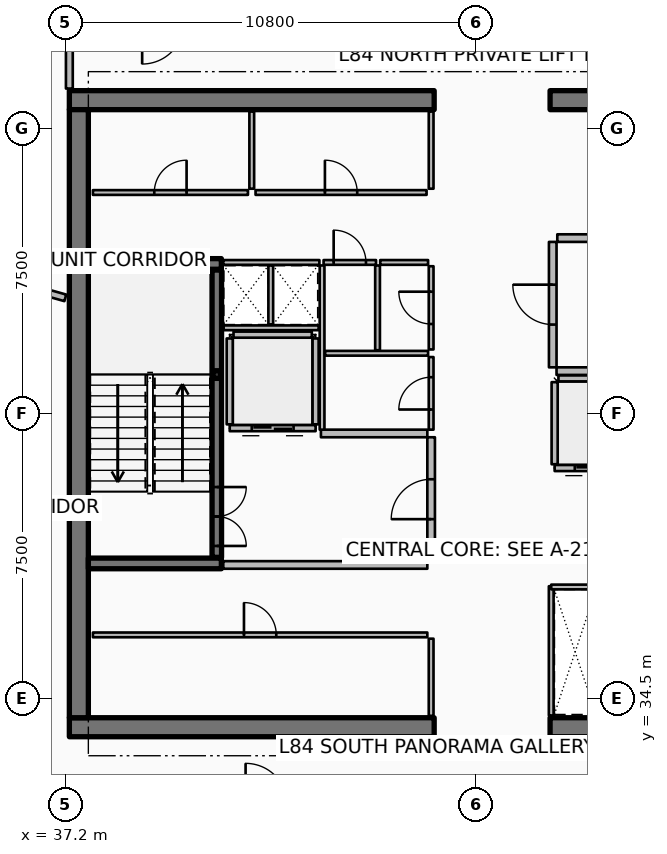
"""IFC4 building model, lengths in metres.
Left out: names, types, materials, properties, quantities, classifications, styles, units other than length and angle.
Written with IfcOpenShell. Run it as: python <this file> out.ifc"""

import sys

from ifc_helpers import new_model, si_unit, direction, frame, frame_2d, origin, origin_2d, place, context, subcontext, project, spatial, rectangle, hollow_rectangle, extrude, element, fill, save


model = new_model("IFC4")
c1 = context("Model", 3, precision=1e-05, world=origin(), true_north=direction((0.0, 1.0)))
c2 = subcontext(c1, "Body", "Model", "MODEL_VIEW")
j1 = project(units=[si_unit("LENGTHUNIT", "METRE"), si_unit("PLANEANGLEUNIT", "RADIAN")], contexts=[c1])
p1 = place(None, origin())
s1 = spatial("IfcSite", under=j1, at=p1, CompositionType="ELEMENT")
p2 = place(p1, origin())
s2 = spatial("IfcBuilding", under=s1, at=p2, CompositionType="ELEMENT")
p3 = place(p2, frame((0.0, 0.0, 334.7)))
s3 = spatial("IfcBuildingStorey", under=s2, at=p3, CompositionType="ELEMENT", Elevation=334.7)
p4 = place(p3, frame((37.3, 33.75, 0.0), z_axis=(0.0, 0.0, 1.0), x_axis=(1.0, 0.0, 0.0)))
e1 = element("IfcWall", 1, at=p4, inside=s3, PredefinedType="SHEAR", context=c2, shape_type="SweptSolid", body=[
    extrude(rectangle(XDim=9.6, YDim=0.5, at=frame_2d((4.8, 0.0))), origin(), (0.0, 0.0, 1.0), 4.2),
])
p5 = place(p3, frame((49.95, 33.75, 0.0), z_axis=(0.0, 0.0, 1.0), x_axis=(1.0, 0.0, 0.0)))
e2 = element("IfcWall", 2, at=p5, inside=s3, PredefinedType="SHEAR", context=c2, shape_type="SweptSolid", body=[
    extrude(rectangle(XDim=9.6, YDim=0.5, at=frame_2d((4.8, 0.0))), origin(), (0.0, 0.0, 1.0), 4.2),
])
p6 = place(p3, frame((37.3, 50.25, 0.0), z_axis=(0.0, 0.0, 1.0), x_axis=(1.0, 0.0, 0.0)))
e3 = element("IfcWall", 3, at=p6, inside=s3, PredefinedType="SHEAR", context=c2, shape_type="SweptSolid", body=[
    extrude(rectangle(XDim=9.6, YDim=0.5, at=frame_2d((4.8, 0.0))), origin(), (0.0, 0.0, 1.0), 4.2),
])
p7 = place(p3, frame((49.95, 50.25, 0.0), z_axis=(0.0, 0.0, 1.0), x_axis=(1.0, 0.0, 0.0)))
e4 = element("IfcWall", 4, at=p7, inside=s3, PredefinedType="SHEAR", context=c2, shape_type="SweptSolid", body=[
    extrude(rectangle(XDim=9.6, YDim=0.5, at=frame_2d((4.8, 0.0))), origin(), (0.0, 0.0, 1.0), 4.2),
])
p8 = place(p3, frame((37.55, 34.0, 0.0), z_axis=(0.0, 0.0, 1.0), x_axis=(0.0, 1.0, 0.0)))
e5 = element("IfcWall", 5, at=p8, inside=s3, PredefinedType="SHEAR", context=c2, shape_type="SweptSolid", body=[
    extrude(rectangle(XDim=16.0, YDim=0.5, at=frame_2d((8.0, 0.0))), origin(), (0.0, 0.0, 1.0), 4.2),
])
for number, where, z_axis, x_axis in (
    (6, (37.8, 38.06, 0.0), (0.0, 0.0, 1.0), (1.0, 0.0, 0.0)),
    (7, (37.8, 45.94, 0.0), (0.0, 0.0, 1.0), (1.0, 0.0, 0.0)),
):
    element("IfcWall", number, at=place(p3, frame(where, z_axis=z_axis, x_axis=x_axis)), inside=s3, PredefinedType="SHEAR", context=c2, shape_type="SweptSolid", body=[
        extrude(rectangle(XDim=3.5, YDim=0.28, at=frame_2d((1.75, 0.0))), origin(), (0.0, 0.0, 1.0), 4.2),
    ])
p9 = place(p3, frame((41.18, 43.03, 0.0), z_axis=(0.0, 0.0, 1.0), x_axis=(1.0, 0.0, 0.0)))
e8 = element("IfcColumn", 8, at=p9, inside=s3, PredefinedType="COLUMN", context=c2, shape_type="SweptSolid", body=[
    extrude(hollow_rectangle(XDim=0.2, YDim=0.2, WallThickness=0.01, InnerFilletRadius=0.01, OuterFilletRadius=0.02, at=origin_2d()), origin(), (0.0, 0.0, 1.0), 1.895),
])
p10 = place(p3, frame((41.18, 38.22, 0.0), z_axis=(0.0, 0.0, 1.0), x_axis=(0.0, 1.0, 0.0)))
e9 = element("IfcWall", 9, at=p10, inside=s3, PredefinedType="SOLIDWALL", context=c2, shape_type="SweptSolid", body=[
    extrude(rectangle(XDim=7.56, YDim=0.25, at=frame_2d((3.78, 0.0))), origin(), (0.0, 0.0, 1.0), 3.94),
])
p11 = place(p10, frame((0.3, 0.0, 0.0)))
e10 = element("IfcOpeningElement", 10, at=p11, cuts=e9, PredefinedType="OPENING", context=c2, shape_type="SweptSolid", body=[
    extrude(rectangle(XDim=1.55, YDim=2.15, at=frame_2d((0.775, 1.075))), frame((0.0, 0.135, 0.0), z_axis=(0.0, -1.0, 0.0), x_axis=(1.0, 0.0, 0.0)), (0.0, 0.0, 1.0), 0.27),
])
p12 = place(p3, frame((43.78, 41.62, 0.0), z_axis=(0.0, 0.0, 1.0), x_axis=(-1.0, 0.0, 0.0)))
e11 = element("IfcWall", 11, at=p12, inside=s3, PredefinedType="PARTITIONING", context=c2, shape_type="SweptSolid", body=[
    extrude(rectangle(XDim=2.26, YDim=0.16, at=frame_2d((1.13, 0.0))), origin(), (0.0, 0.0, 1.0), 3.94),
])
p13 = place(p12, frame((0.58, 0.0, 0.0)))
e12 = element("IfcOpeningElement", 12, at=p13, cuts=e11, PredefinedType="OPENING", context=c2, shape_type="SweptSolid", body=[
    extrude(rectangle(XDim=1.1, YDim=2.1, at=frame_2d((0.55, 1.05))), frame((0.0, 0.09, 0.0), z_axis=(0.0, -1.0, 0.0), x_axis=(1.0, 0.0, 0.0)), (0.0, 0.0, 1.0), 0.18),
])
for number, where, z_axis, x_axis in (
    (13, (43.78, 41.72, 0.0), (0.0, 0.0, 1.0), (0.0, 1.0, 0.0)),
    (14, (41.52, 41.72, 0.0), (0.0, 0.0, 1.0), (0.0, 1.0, 0.0)),
):
    element("IfcWall", number, at=place(p3, frame(where, z_axis=z_axis, x_axis=x_axis)), inside=s3, PredefinedType="PARTITIONING", context=c2, shape_type="SweptSolid", body=[
        extrude(rectangle(XDim=2.26, YDim=0.16, at=frame_2d((1.13, 0.0))), origin(), (0.0, 0.0, 1.0), 3.94),
    ])
p14 = place(p3, frame((41.62, 44.08, 0.0), z_axis=(0.0, 0.0, 1.0), x_axis=(1.0, 0.0, 0.0)))
e15 = element("IfcWall", 15, at=p14, inside=s3, PredefinedType="PARTITIONING", context=c2, shape_type="SweptSolid", body=[
    extrude(rectangle(XDim=2.06, YDim=0.16, at=frame_2d((1.03, 0.0))), origin(), (0.0, 0.0, 1.0), 3.94),
])
p15 = place(p3, frame((52.23, 40.57, 0.0), z_axis=(0.0, 0.0, 1.0), x_axis=(-1.0, 0.0, 0.0)))
e16 = element("IfcWall", 16, at=p15, inside=s3, PredefinedType="PARTITIONING", context=c2, shape_type="SweptSolid", body=[
    extrude(rectangle(XDim=2.16, YDim=0.16, at=frame_2d((1.08, 0.0))), origin(), (0.0, 0.0, 1.0), 3.94),
])
p16 = place(p15, frame((0.53, 0.0, 0.0)))
e17 = element("IfcOpeningElement", 17, at=p16, cuts=e16, PredefinedType="OPENING", context=c2, shape_type="SweptSolid", body=[
    extrude(rectangle(XDim=1.1, YDim=2.1, at=frame_2d((0.55, 1.05))), frame((0.0, 0.09, 0.0), z_axis=(0.0, -1.0, 0.0), x_axis=(1.0, 0.0, 0.0)), (0.0, 0.0, 1.0), 0.18),
])
p17 = place(p3, frame((50.07, 40.67, 0.0), z_axis=(0.0, 0.0, 1.0), x_axis=(0.0, 1.0, 0.0)))
e18 = element("IfcWall", 18, at=p17, inside=s3, PredefinedType="PARTITIONING", context=c2, shape_type="SweptSolid", body=[
    extrude(rectangle(XDim=2.16, YDim=0.16, at=frame_2d((1.08, 0.0))), origin(), (0.0, 0.0, 1.0), 3.94),
])
p18 = place(p3, frame((50.17, 42.93, 0.0), z_axis=(0.0, 0.0, 1.0), x_axis=(1.0, 0.0, 0.0)))
e19 = element("IfcWall", 19, at=p18, inside=s3, PredefinedType="PARTITIONING", context=c2, shape_type="SweptSolid", body=[
    extrude(rectangle(XDim=1.96, YDim=0.16, at=frame_2d((0.98, 0.0))), origin(), (0.0, 0.0, 1.0), 3.94),
])
p19 = place(p3, frame((46.82, 34.05, 0.0), z_axis=(0.0, 0.0, 1.0), x_axis=(0.0, 1.0, 0.0)))
e20 = element("IfcWall", 20, at=p19, inside=s3, PredefinedType="PARTITIONING", context=c2, shape_type="SweptSolid", body=[
    extrude(rectangle(XDim=2.03, YDim=0.125, at=frame_2d((1.015, 0.0))), origin(), (0.0, 0.0, 1.0), 3.38),
])
p20 = place(p3, frame((37.92, 36.18, 0.0), z_axis=(0.0, 0.0, 1.0), x_axis=(1.0, 0.0, 0.0)))
e21 = element("IfcWall", 21, at=p20, inside=s3, PredefinedType="PARTITIONING", context=c2, shape_type="SweptSolid", body=[
    extrude(rectangle(XDim=8.8, YDim=0.125, at=frame_2d((4.4, 0.0))), origin(), (0.0, 0.0, 1.0), 3.38),
])
p21 = place(p20, frame((3.975, 0.0, 0.0)))
e22 = element("IfcOpeningElement", 22, at=p21, cuts=e21, PredefinedType="OPENING", context=c2, shape_type="SweptSolid", body=[
    extrude(rectangle(XDim=0.85, YDim=2.06, at=frame_2d((0.425, 1.03))), frame((0.0, 0.073, 0.0), z_axis=(0.0, -1.0, 0.0), x_axis=(1.0, 0.0, 0.0)), (0.0, 0.0, 1.0), 0.145),
])
for number, where, z_axis, x_axis in (
    (23, (46.82, 47.92, 0.0), (0.0, 0.0, 1.0), (0.0, 1.0, 0.0)),
    (24, (42.1, 47.92, 0.0), (0.0, 0.0, 1.0), (0.0, 1.0, 0.0)),
):
    element("IfcWall", number, at=place(p3, frame(where, z_axis=z_axis, x_axis=x_axis)), inside=s3, PredefinedType="PARTITIONING", context=c2, shape_type="SweptSolid", body=[
        extrude(rectangle(XDim=2.03, YDim=0.125, at=frame_2d((1.015, 0.0))), origin(), (0.0, 0.0, 1.0), 3.38),
    ])
p22 = place(p3, frame((37.92, 47.82, 0.0), z_axis=(0.0, 0.0, 1.0), x_axis=(1.0, 0.0, 0.0)))
e25 = element("IfcWall", 25, at=p22, inside=s3, PredefinedType="PARTITIONING", context=c2, shape_type="SweptSolid", body=[
    extrude(rectangle(XDim=4.08, YDim=0.125, at=frame_2d((2.04, 0.0))), origin(), (0.0, 0.0, 1.0), 3.38),
])
p23 = place(p22, frame((1.615, 0.0, 0.0)))
e26 = element("IfcOpeningElement", 26, at=p23, cuts=e25, PredefinedType="OPENING", context=c2, shape_type="SweptSolid", body=[
    extrude(rectangle(XDim=0.85, YDim=2.06, at=frame_2d((0.425, 1.03))), frame((0.0, 0.073, 0.0), z_axis=(0.0, -1.0, 0.0), x_axis=(1.0, 0.0, 0.0)), (0.0, 0.0, 1.0), 0.145),
])
p24 = place(p3, frame((42.2, 47.82, 0.0), z_axis=(0.0, 0.0, 1.0), x_axis=(1.0, 0.0, 0.0)))
e27 = element("IfcWall", 27, at=p24, inside=s3, PredefinedType="PARTITIONING", context=c2, shape_type="SweptSolid", body=[
    extrude(rectangle(XDim=4.5, YDim=0.125, at=frame_2d((2.25, 0.0))), origin(), (0.0, 0.0, 1.0), 3.38),
])
p25 = place(p24, frame((1.825, 0.0, 0.0)))
e28 = element("IfcOpeningElement", 28, at=p25, cuts=e27, PredefinedType="OPENING", context=c2, shape_type="SweptSolid", body=[
    extrude(rectangle(XDim=0.85, YDim=2.06, at=frame_2d((0.425, 1.03))), frame((0.0, 0.073, 0.0), z_axis=(0.0, -1.0, 0.0), x_axis=(1.0, 0.0, 0.0)), (0.0, 0.0, 1.0), 0.145),
])
p26 = place(p3, frame((41.35, 38.02, 0.0), z_axis=(0.0, 0.0, 1.0), x_axis=(1.0, 0.0, 0.0)))
e29 = element("IfcWall", 29, at=p26, inside=s3, PredefinedType="PARTITIONING", context=c2, shape_type="SweptSolid", body=[
    extrude(rectangle(XDim=5.37, YDim=0.2, at=frame_2d((2.685, 0.0))), origin(), (0.0, 0.0, 1.0), 3.94),
])
p27 = place(p3, frame((43.92, 41.48, 0.0), z_axis=(0.0, 0.0, 1.0), x_axis=(1.0, 0.0, 0.0)))
e30 = element("IfcWall", 30, at=p27, inside=s3, PredefinedType="PARTITIONING", context=c2, shape_type="SweptSolid", body=[
    extrude(rectangle(XDim=2.8, YDim=0.2, at=frame_2d((1.4, 0.0))), origin(), (0.0, 0.0, 1.0), 3.94),
])
p28 = place(p3, frame((46.82, 38.12, 0.0), z_axis=(0.0, 0.0, 1.0), x_axis=(0.0, 1.0, 0.0)))
e31 = element("IfcWall", 31, at=p28, inside=s3, PredefinedType="PARTITIONING", context=c2, shape_type="SweptSolid", body=[
    extrude(rectangle(XDim=3.26, YDim=0.2, at=frame_2d((1.63, 0.0))), origin(), (0.0, 0.0, 1.0), 3.94),
])
p29 = place(p28, frame((1.105, 0.0, 0.0)))
e32 = element("IfcOpeningElement", 32, at=p29, cuts=e31, PredefinedType="OPENING", context=c2, shape_type="SweptSolid", body=[
    extrude(rectangle(XDim=1.05, YDim=2.1, at=frame_2d((0.525, 1.05))), frame((0.0, 0.11, 0.0), z_axis=(0.0, -1.0, 0.0), x_axis=(1.0, 0.0, 0.0)), (0.0, 0.0, 1.0), 0.22),
])
p30 = place(p3, frame((50.12, 43.12, 0.0), z_axis=(0.0, 0.0, 1.0), x_axis=(1.0, 0.0, 0.0)))
e33 = element("IfcWall", 33, at=p30, inside=s3, PredefinedType="PARTITIONING", context=c2, shape_type="SweptSolid", body=[
    extrude(rectangle(XDim=8.88, YDim=0.2, at=frame_2d((4.44, 0.0))), origin(), (0.0, 0.0, 1.0), 3.94),
])
p31 = place(p3, frame((50.14, 46.62, 0.0), z_axis=(0.0, 0.0, 1.0), x_axis=(1.0, 0.0, 0.0)))
e34 = element("IfcWall", 34, at=p31, inside=s3, PredefinedType="PARTITIONING", context=c2, shape_type="SweptSolid", body=[
    extrude(rectangle(XDim=1.02, YDim=0.2, at=frame_2d((0.51, 0.0))), origin(), (0.0, 0.0, 1.0), 3.94),
])
p32 = place(p3, frame((50.02, 43.22, 0.0), z_axis=(0.0, 0.0, 1.0), x_axis=(0.0, 1.0, 0.0)))
e35 = element("IfcWall", 35, at=p32, inside=s3, PredefinedType="PARTITIONING", context=c2, shape_type="SweptSolid", body=[
    extrude(rectangle(XDim=3.3, YDim=0.2, at=frame_2d((1.65, 0.0))), origin(), (0.0, 0.0, 1.0), 3.94),
])
p33 = place(p32, frame((1.125, 0.0, 0.0)))
e36 = element("IfcOpeningElement", 36, at=p33, cuts=e35, PredefinedType="OPENING", context=c2, shape_type="SweptSolid", body=[
    extrude(rectangle(XDim=1.05, YDim=2.1, at=frame_2d((0.525, 1.05))), frame((0.0, 0.11, 0.0), z_axis=(0.0, -1.0, 0.0), x_axis=(1.0, 0.0, 0.0)), (0.0, 0.0, 1.0), 0.22),
])
p34 = place(p3, frame((41.36, 44.26, 0.0), z_axis=(0.0, 0.0, 1.0), x_axis=(1.0, 0.0, 0.0)))
e37 = element("IfcWall", 37, at=p34, inside=s3, PredefinedType="PARTITIONING", context=c2, shape_type="SweptSolid", body=[
    extrude(rectangle(XDim=2.5, YDim=0.125, at=frame_2d((1.25, 0.0))), origin(), (0.0, 0.0, 1.0), 3.38),
])
p35 = place(p3, frame((42.6, 44.35, 0.0), z_axis=(0.0, 0.0, 1.0), x_axis=(0.0, 1.0, 0.0)))
e38 = element("IfcWall", 38, at=p35, inside=s3, PredefinedType="PARTITIONING", context=c2, shape_type="SweptSolid", body=[
    extrude(rectangle(XDim=1.55, YDim=0.125, at=frame_2d((0.775, 0.0))), origin(), (0.0, 0.0, 1.0), 3.38),
])
p36 = place(p3, frame((49.98, 34.06, 0.0), z_axis=(0.0, 0.0, 1.0), x_axis=(0.0, 1.0, 0.0)))
e39 = element("IfcWall", 39, at=p36, inside=s3, PredefinedType="PARTITIONING", context=c2, shape_type="SweptSolid", body=[
    extrude(rectangle(XDim=3.4, YDim=0.125, at=frame_2d((1.7, 0.0))), origin(), (0.0, 0.0, 1.0), 3.38),
])
p37 = place(p3, frame((49.98, 37.44, 0.0), z_axis=(0.0, 0.0, 1.0), x_axis=(1.0, 0.0, 0.0)))
e40 = element("IfcWall", 40, at=p37, inside=s3, PredefinedType="PARTITIONING", context=c2, shape_type="SweptSolid", body=[
    extrude(rectangle(XDim=1.26, YDim=0.125, at=frame_2d((0.63, 0.0))), origin(), (0.0, 0.0, 1.0), 3.38),
])
p38 = place(p3, frame((43.95, 41.58, 0.0), z_axis=(0.0, 0.0, 1.0), x_axis=(0.0, 1.0, 0.0)))
e41 = element("IfcWall", 41, at=p38, inside=s3, PredefinedType="PARTITIONING", context=c2, shape_type="SweptSolid", body=[
    extrude(rectangle(XDim=4.32, YDim=0.125, at=frame_2d((2.16, 0.0))), origin(), (0.0, 0.0, 1.0), 3.38),
])
p39 = place(p3, frame((44.03, 43.59, 0.0), z_axis=(0.0, 0.0, 1.0), x_axis=(1.0, 0.0, 0.0)))
e42 = element("IfcWall", 42, at=p39, inside=s3, PredefinedType="PARTITIONING", context=c2, shape_type="SweptSolid", body=[
    extrude(rectangle(XDim=2.71, YDim=0.125, at=frame_2d((1.355, 0.0))), origin(), (0.0, 0.0, 1.0), 3.38),
])
p40 = place(p3, frame((45.41, 43.67, 0.0), z_axis=(0.0, 0.0, 1.0), x_axis=(0.0, 1.0, 0.0)))
e43 = element("IfcWall", 43, at=p40, inside=s3, PredefinedType="PARTITIONING", context=c2, shape_type="SweptSolid", body=[
    extrude(rectangle(XDim=2.23, YDim=0.125, at=frame_2d((1.115, 0.0))), origin(), (0.0, 0.0, 1.0), 3.38),
])
p41 = place(p3, frame((46.82, 41.58, 0.0), z_axis=(0.0, 0.0, 1.0), x_axis=(0.0, 1.0, 0.0)))
e44 = element("IfcWall", 44, at=p41, inside=s3, PredefinedType="PARTITIONING", context=c2, shape_type="SweptSolid", body=[
    extrude(rectangle(XDim=1.91, YDim=0.125, at=frame_2d((0.955, 0.0))), origin(), (0.0, 0.0, 1.0), 3.38),
])
p42 = place(p41, frame((0.53, 0.0, 0.0)))
e45 = element("IfcOpeningElement", 45, at=p42, cuts=e44, PredefinedType="OPENING", context=c2, shape_type="SweptSolid", body=[
    extrude(rectangle(XDim=0.85, YDim=2.06, at=frame_2d((0.425, 1.03))), frame((0.0, 0.073, 0.0), z_axis=(0.0, -1.0, 0.0), x_axis=(1.0, 0.0, 0.0)), (0.0, 0.0, 1.0), 0.145),
])
p43 = place(p3, frame((46.82, 43.69, 0.0), z_axis=(0.0, 0.0, 1.0), x_axis=(0.0, 1.0, 0.0)))
e46 = element("IfcWall", 46, at=p43, inside=s3, PredefinedType="PARTITIONING", context=c2, shape_type="SweptSolid", body=[
    extrude(rectangle(XDim=2.19, YDim=0.125, at=frame_2d((1.095, 0.0))), origin(), (0.0, 0.0, 1.0), 3.38),
])
p44 = place(p43, frame((0.67, 0.0, 0.0)))
e47 = element("IfcOpeningElement", 47, at=p44, cuts=e46, PredefinedType="OPENING", context=c2, shape_type="SweptSolid", body=[
    extrude(rectangle(XDim=0.85, YDim=2.06, at=frame_2d((0.425, 1.03))), frame((0.0, 0.073, 0.0), z_axis=(0.0, -1.0, 0.0), x_axis=(1.0, 0.0, 0.0)), (0.0, 0.0, 1.0), 0.145),
])
p45 = place(p3, frame((41.35, 45.98, 0.0), z_axis=(0.0, 0.0, 1.0), x_axis=(1.0, 0.0, 0.0)))
e48 = element("IfcWall", 48, at=p45, inside=s3, PredefinedType="PARTITIONING", context=c2, shape_type="SweptSolid", body=[
    extrude(rectangle(XDim=2.53, YDim=0.125, at=frame_2d((1.265, 0.0))), origin(), (0.0, 0.0, 1.0), 3.38),
])
p46 = place(p3, frame((43.99, 45.98, 0.0), z_axis=(0.0, 0.0, 1.0), x_axis=(1.0, 0.0, 0.0)))
e49 = element("IfcWall", 49, at=p46, inside=s3, PredefinedType="PARTITIONING", context=c2, shape_type="SweptSolid", body=[
    extrude(rectangle(XDim=1.38, YDim=0.125, at=frame_2d((0.69, 0.0))), origin(), (0.0, 0.0, 1.0), 3.38),
])
p47 = place(p46, frame((0.265, 0.0, 0.0)))
e50 = element("IfcOpeningElement", 50, at=p47, cuts=e49, PredefinedType="OPENING", context=c2, shape_type="SweptSolid", body=[
    extrude(rectangle(XDim=0.85, YDim=2.06, at=frame_2d((0.425, 1.03))), frame((0.0, 0.073, 0.0), z_axis=(0.0, -1.0, 0.0), x_axis=(1.0, 0.0, 0.0)), (0.0, 0.0, 1.0), 0.145),
])
p48 = place(p3, frame((45.48, 45.98, 0.0), z_axis=(0.0, 0.0, 1.0), x_axis=(1.0, 0.0, 0.0)))
e51 = element("IfcWall", 51, at=p48, inside=s3, PredefinedType="PARTITIONING", context=c2, shape_type="SweptSolid", body=[
    extrude(rectangle(XDim=1.26, YDim=0.125, at=frame_2d((0.63, 0.0))), origin(), (0.0, 0.0, 1.0), 3.38),
])
p49 = place(p3, frame((37.194, 45.048, 0.0), z_axis=(0.0, 0.0, 1.0), x_axis=(-0.962457024049, 0.271434111451, 0.0)))
e52 = element("IfcWall", 52, at=p49, inside=s3, PredefinedType="PARTITIONING", context=c2, shape_type="SweptSolid", body=[
    extrude(rectangle(XDim=13.799, YDim=0.18, at=frame_2d((6.9, 0.0))), origin(), (0.0, 0.0, 1.0), 3.38),
])
p50 = place(p3, frame((37.3, 52.18, 0.0), z_axis=(0.0, 0.0, 1.0), x_axis=(0.0, -1.0, 0.0)))
e53 = element("IfcWall", 53, at=p50, inside=s3, PredefinedType="PARTITIONING", context=c2, shape_type="SweptSolid", body=[
    extrude(rectangle(XDim=1.625, YDim=0.18, at=frame_2d((0.812, 0.0))), origin(), (0.0, 0.0, 1.0), 3.38),
])
p51 = place(p3, frame((33.307, 33.648, 0.0), z_axis=(0.0, 0.0, 1.0), x_axis=(0.649467421322, -0.760389419075, 0.0)))
e54 = element("IfcWall", 54, at=p51, inside=s3, PredefinedType="PARTITIONING", context=c2, shape_type="SweptSolid", body=[
    extrude(rectangle(XDim=6.383, YDim=0.125, at=frame_2d((3.191, 0.0))), origin(), (0.0, 0.0, 1.0), 3.38),
])
p52 = place(p51, frame((2.741, 0.0, 0.0)))
e55 = element("IfcOpeningElement", 55, at=p52, cuts=e54, PredefinedType="OPENING", context=c2, shape_type="SweptSolid", body=[
    extrude(rectangle(XDim=0.9, YDim=2.08, at=frame_2d((0.45, 1.04))), frame((0.0, 0.073, 0.0), z_axis=(0.0, -1.0, 0.0), x_axis=(1.0, 0.0, 0.0)), (0.0, 0.0, 1.0), 0.145),
])
p53 = place(p11, origin())
e56 = element("IfcDoor", 56, at=p53, inside=s3, OperationType="DOUBLE_DOOR_SINGLE_SWING", PredefinedType="DOOR", context=c2, shape_type="SweptSolid", body=[
    extrude(rectangle(XDim=1.55, YDim=2.15, at=frame_2d((0.775, 1.075))), frame((0.0, 0.025, 0.0), z_axis=(0.0, -1.0, 0.0), x_axis=(1.0, 0.0, 0.0)), (0.0, 0.0, 1.0), 0.05),
])
fill(e10, e56)
p54 = place(p13, origin())
e57 = element("IfcDoor", 57, at=p54, inside=s3, OperationType="DOUBLE_DOOR_SLIDING", PredefinedType="DOOR", context=c2, shape_type="SweptSolid", body=[
    extrude(rectangle(XDim=1.1, YDim=2.1, at=frame_2d((0.55, 1.05))), frame((0.0, 0.025, 0.0), z_axis=(0.0, -1.0, 0.0), x_axis=(1.0, 0.0, 0.0)), (0.0, 0.0, 1.0), 0.05),
])
fill(e12, e57)
p55 = place(p16, origin())
e58 = element("IfcDoor", 58, at=p55, inside=s3, OperationType="DOUBLE_DOOR_SLIDING", PredefinedType="DOOR", context=c2, shape_type="SweptSolid", body=[
    extrude(rectangle(XDim=1.1, YDim=2.1, at=frame_2d((0.55, 1.05))), frame((0.0, 0.025, 0.0), z_axis=(0.0, -1.0, 0.0), x_axis=(1.0, 0.0, 0.0)), (0.0, 0.0, 1.0), 0.05),
])
fill(e17, e58)
p56 = place(p21, origin())
e59 = element("IfcDoor", 59, at=p56, inside=s3, OperationType="SINGLE_SWING_LEFT", PredefinedType="DOOR", context=c2, shape_type="SweptSolid", body=[
    extrude(rectangle(XDim=0.85, YDim=2.06, at=frame_2d((0.425, 1.03))), frame((0.0, 0.025, 0.0), z_axis=(0.0, -1.0, 0.0), x_axis=(1.0, 0.0, 0.0)), (0.0, 0.0, 1.0), 0.05),
])
fill(e22, e59)
p57 = place(p23, origin())
e60 = element("IfcDoor", 60, at=p57, inside=s3, OperationType="SINGLE_SWING_RIGHT", PredefinedType="DOOR", context=c2, shape_type="SweptSolid", body=[
    extrude(rectangle(XDim=0.85, YDim=2.06, at=frame_2d((0.425, 1.03))), frame((0.0, 0.025, 0.0), z_axis=(0.0, -1.0, 0.0), x_axis=(1.0, 0.0, 0.0)), (0.0, 0.0, 1.0), 0.05),
])
fill(e26, e60)
p58 = place(p25, origin())
e61 = element("IfcDoor", 61, at=p58, inside=s3, OperationType="SINGLE_SWING_LEFT", PredefinedType="DOOR", context=c2, shape_type="SweptSolid", body=[
    extrude(rectangle(XDim=0.85, YDim=2.06, at=frame_2d((0.425, 1.03))), frame((0.0, 0.025, 0.0), z_axis=(0.0, -1.0, 0.0), x_axis=(1.0, 0.0, 0.0)), (0.0, 0.0, 1.0), 0.05),
])
fill(e28, e61)
p59 = place(p29, origin())
e62 = element("IfcDoor", 62, at=p59, inside=s3, OperationType="SINGLE_SWING_LEFT", PredefinedType="DOOR", context=c2, shape_type="SweptSolid", body=[
    extrude(rectangle(XDim=1.05, YDim=2.1, at=frame_2d((0.525, 1.05))), frame((0.0, 0.025, 0.0), z_axis=(0.0, -1.0, 0.0), x_axis=(1.0, 0.0, 0.0)), (0.0, 0.0, 1.0), 0.05),
])
fill(e32, e62)
p60 = place(p33, origin())
e63 = element("IfcDoor", 63, at=p60, inside=s3, OperationType="SINGLE_SWING_RIGHT", PredefinedType="DOOR", context=c2, shape_type="SweptSolid", body=[
    extrude(rectangle(XDim=1.05, YDim=2.1, at=frame_2d((0.525, 1.05))), frame((0.0, 0.025, 0.0), z_axis=(0.0, -1.0, 0.0), x_axis=(1.0, 0.0, 0.0)), (0.0, 0.0, 1.0), 0.05),
])
fill(e36, e63)
p61 = place(p42, origin())
e64 = element("IfcDoor", 64, at=p61, inside=s3, OperationType="SINGLE_SWING_LEFT", PredefinedType="DOOR", context=c2, shape_type="SweptSolid", body=[
    extrude(rectangle(XDim=0.85, YDim=2.06, at=frame_2d((0.425, 1.03))), frame((0.0, 0.025, 0.0), z_axis=(0.0, -1.0, 0.0), x_axis=(1.0, 0.0, 0.0)), (0.0, 0.0, 1.0), 0.05),
])
fill(e45, e64)
p62 = place(p44, origin())
e65 = element("IfcDoor", 65, at=p62, inside=s3, OperationType="SINGLE_SWING_RIGHT", PredefinedType="DOOR", context=c2, shape_type="SweptSolid", body=[
    extrude(rectangle(XDim=0.85, YDim=2.06, at=frame_2d((0.425, 1.03))), frame((0.0, 0.025, 0.0), z_axis=(0.0, -1.0, 0.0), x_axis=(1.0, 0.0, 0.0)), (0.0, 0.0, 1.0), 0.05),
])
fill(e47, e65)
p63 = place(p47, origin())
e66 = element("IfcDoor", 66, at=p63, inside=s3, OperationType="SINGLE_SWING_LEFT", PredefinedType="DOOR", context=c2, shape_type="SweptSolid", body=[
    extrude(rectangle(XDim=0.85, YDim=2.06, at=frame_2d((0.425, 1.03))), frame((0.0, 0.025, 0.0), z_axis=(0.0, -1.0, 0.0), x_axis=(1.0, 0.0, 0.0)), (0.0, 0.0, 1.0), 0.05),
])
fill(e50, e66)
save(model, sys.argv[1])
